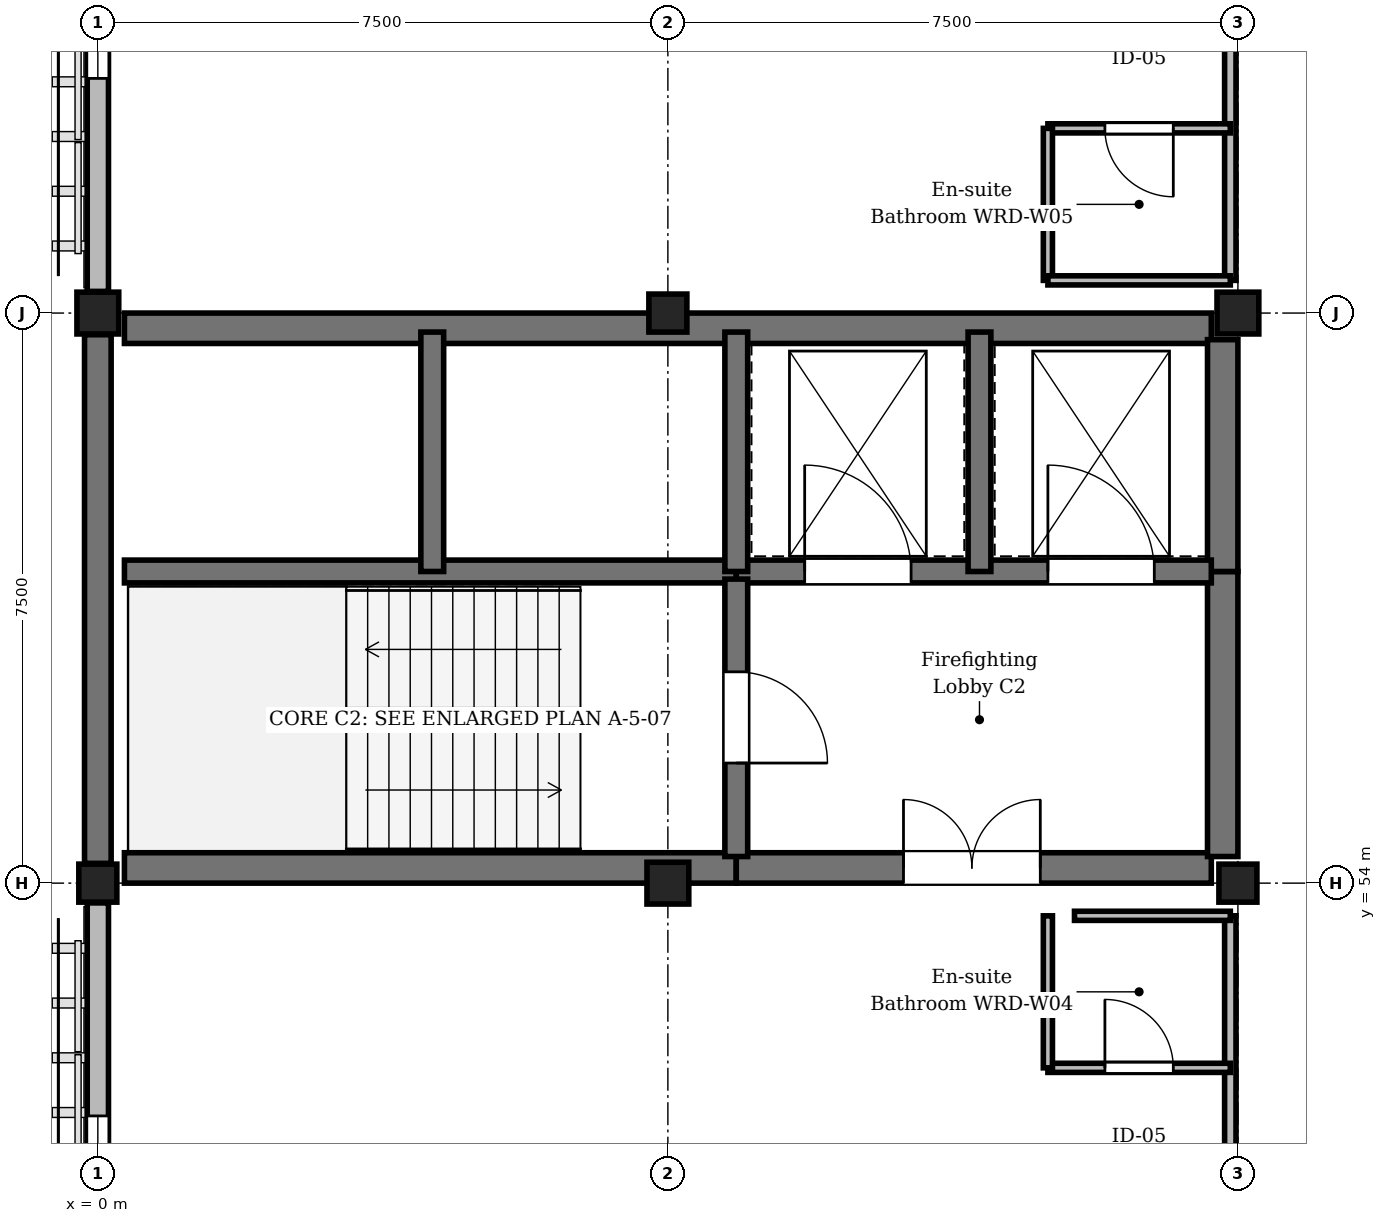
"""IFC4 building model, lengths in metres.
Left out: names, types, materials, properties, quantities, classifications, styles, units other than length and angle.
Written with IfcOpenShell. Run it as: python <this file> out.ifc"""

import sys

from ifc_helpers import new_model, si_unit, direction, frame, frame_2d, origin, origin_2d, place, context, subcontext, project, spatial, rectangle, extrude, element, fill, save


model = new_model("IFC4")
c1 = context("Model", 3, precision=1e-05, world=origin(), true_north=direction((0.0, 1.0)))
c2 = subcontext(c1, "Body", "Model", "MODEL_VIEW")
j1 = project(units=[si_unit("LENGTHUNIT", "METRE"), si_unit("PLANEANGLEUNIT", "RADIAN")], contexts=[c1])
p1 = place(None, origin())
s1 = spatial("IfcSite", under=j1, at=p1, CompositionType="ELEMENT")
p2 = place(p1, origin())
s2 = spatial("IfcBuilding", under=s1, at=p2, CompositionType="ELEMENT")
p3 = place(p2, frame((0.0, 0.0, 25.95)))
s3 = spatial("IfcBuildingStorey", under=s2, at=p3, CompositionType="ELEMENT", Elevation=25.95)
p4 = place(p3, frame((0.0, 54.0, 0.0), z_axis=(0.0, 0.0, 1.0), x_axis=(1.0, 0.0, 0.0)))
e1 = element("IfcColumn", 1, at=p4, inside=s3, PredefinedType="COLUMN", context=c2, shape_type="SweptSolid", body=[
    extrude(rectangle(XDim=0.5, YDim=0.5, at=origin_2d()), origin(), (0.0, 0.0, 1.0), 4.05),
])
for number, where, z_axis, x_axis in (
    (2, (0.0, 61.5, 0.0), (0.0, 0.0, 1.0), (1.0, 0.0, 0.0)),
    (3, (7.5, 54.0, 0.0), (0.0, 0.0, 1.0), (1.0, 0.0, 0.0)),
):
    element("IfcColumn", number, at=place(p3, frame(where, z_axis=z_axis, x_axis=x_axis)), inside=s3, PredefinedType="COLUMN", context=c2, shape_type="SweptSolid", body=[
        extrude(rectangle(XDim=0.55, YDim=0.55, at=origin_2d()), origin(), (0.0, 0.0, 1.0), 4.05),
    ])
for number, where, z_axis, x_axis in (
    (4, (7.5, 61.5, 0.0), (0.0, 0.0, 1.0), (1.0, 0.0, 0.0)),
    (5, (15.0, 54.0, 0.0), (0.0, 0.0, 1.0), (1.0, 0.0, 0.0)),
):
    element("IfcColumn", number, at=place(p3, frame(where, z_axis=z_axis, x_axis=x_axis)), inside=s3, PredefinedType="COLUMN", context=c2, shape_type="SweptSolid", body=[
        extrude(rectangle(XDim=0.5, YDim=0.5, at=origin_2d()), origin(), (0.0, 0.0, 1.0), 4.05),
    ])
p5 = place(p3, frame((15.0, 61.5, 0.0), z_axis=(0.0, 0.0, 1.0), x_axis=(1.0, 0.0, 0.0)))
e6 = element("IfcColumn", 6, at=p5, inside=s3, PredefinedType="COLUMN", context=c2, shape_type="SweptSolid", body=[
    extrude(rectangle(XDim=0.55, YDim=0.55, at=origin_2d()), origin(), (0.0, 0.0, 1.0), 4.05),
])
p6 = place(p3, frame((0.0, 46.785, 0.0), z_axis=(0.0, 0.0, 1.0), x_axis=(0.0, 1.0, 0.0)))
e7 = element("IfcWall", 7, at=p6, inside=s3, PredefinedType="STANDARD", context=c2, shape_type="SweptSolid", body=[
    extrude(rectangle(XDim=6.955, YDim=0.28, at=frame_2d((3.478, 0.0))), origin(), (0.0, 0.0, 1.0), 3.17),
])
p7 = place(p6, frame((2.802, 0.0, 0.85)))
e8 = element("IfcOpeningElement", 8, at=p7, cuts=e7, PredefinedType="OPENING", context=c2, shape_type="SweptSolid", body=[
    extrude(rectangle(XDim=1.35, YDim=2.04, at=frame_2d((0.675, 1.02))), frame((0.0, 0.15, 0.0), z_axis=(0.0, -1.0, 0.0), x_axis=(1.0, 0.0, 0.0)), (0.0, 0.0, 1.0), 0.3),
])
p8 = place(p3, frame((0.0, 54.26, 0.0), z_axis=(0.0, 0.0, 1.0), x_axis=(0.0, 1.0, 0.0)))
e9 = element("IfcWall", 9, at=p8, inside=s3, PredefinedType="SHEAR", context=c2, shape_type="SweptSolid", body=[
    extrude(rectangle(XDim=6.955, YDim=0.35, at=frame_2d((3.478, 0.0))), origin(), (0.0, 0.0, 1.0), 3.77),
])
p9 = place(p3, frame((0.0, 61.785, 0.0), z_axis=(0.0, 0.0, 1.0), x_axis=(0.0, 1.0, 0.0)))
e10 = element("IfcWall", 10, at=p9, inside=s3, PredefinedType="STANDARD", context=c2, shape_type="SweptSolid", body=[
    extrude(rectangle(XDim=6.955, YDim=0.28, at=frame_2d((3.478, 0.0))), origin(), (0.0, 0.0, 1.0), 3.17),
])
p10 = place(p9, frame((2.802, 0.0, 0.85)))
e11 = element("IfcOpeningElement", 11, at=p10, cuts=e10, PredefinedType="OPENING", context=c2, shape_type="SweptSolid", body=[
    extrude(rectangle(XDim=1.35, YDim=2.04, at=frame_2d((0.675, 1.02))), frame((0.0, 0.15, 0.0), z_axis=(0.0, -1.0, 0.0), x_axis=(1.0, 0.0, 0.0)), (0.0, 0.0, 1.0), 0.3),
])
p11 = place(p3, frame((0.35, 54.2, 0.0), z_axis=(0.0, 0.0, 1.0), x_axis=(1.0, 0.0, 0.0)))
e12 = element("IfcWall", 12, at=p11, inside=s3, PredefinedType="SHEAR", context=c2, shape_type="SweptSolid", body=[
    extrude(rectangle(XDim=8.05, YDim=0.4, at=frame_2d((4.025, 0.0))), origin(), (0.0, 0.0, 1.0), 3.77),
])
p12 = place(p3, frame((8.4, 54.2, 0.0), z_axis=(0.0, 0.0, 1.0), x_axis=(1.0, 0.0, 0.0)))
e13 = element("IfcWall", 13, at=p12, inside=s3, PredefinedType="SHEAR", context=c2, shape_type="SweptSolid", body=[
    extrude(rectangle(XDim=6.25, YDim=0.4, at=frame_2d((3.125, 0.0))), origin(), (0.0, 0.0, 1.0), 3.77),
])
p13 = place(p12, frame((2.2, 0.0, 0.0)))
e14 = element("IfcOpeningElement", 14, at=p13, cuts=e13, PredefinedType="OPENING", context=c2, shape_type="SweptSolid", body=[
    extrude(rectangle(XDim=1.8, YDim=2.25, at=frame_2d((0.9, 1.125))), frame((0.0, 0.21, 0.0), z_axis=(0.0, -1.0, 0.0), x_axis=(1.0, 0.0, 0.0)), (0.0, 0.0, 1.0), 0.42),
])
p14 = place(p3, frame((0.35, 61.3, 0.0), z_axis=(0.0, 0.0, 1.0), x_axis=(1.0, 0.0, 0.0)))
e15 = element("IfcWall", 15, at=p14, inside=s3, PredefinedType="SHEAR", context=c2, shape_type="SweptSolid", body=[
    extrude(rectangle(XDim=14.3, YDim=0.4, at=frame_2d((7.15, 0.0))), origin(), (0.0, 0.0, 1.0), 3.77),
])
p15 = place(p3, frame((14.8, 54.35, 0.0), z_axis=(0.0, 0.0, 1.0), x_axis=(0.0, 1.0, 0.0)))
e16 = element("IfcWall", 16, at=p15, inside=s3, PredefinedType="SHEAR", context=c2, shape_type="SweptSolid", body=[
    extrude(rectangle(XDim=3.75, YDim=0.4, at=frame_2d((1.875, 0.0))), origin(), (0.0, 0.0, 1.0), 3.77),
])
p16 = place(p3, frame((14.8, 58.1, 0.0), z_axis=(0.0, 0.0, 1.0), x_axis=(0.0, 1.0, 0.0)))
e17 = element("IfcWall", 17, at=p16, inside=s3, PredefinedType="SHEAR", context=c2, shape_type="SweptSolid", body=[
    extrude(rectangle(XDim=3.05, YDim=0.4, at=frame_2d((1.525, 0.0))), origin(), (0.0, 0.0, 1.0), 3.77),
])
p17 = place(p3, frame((0.35, 58.1, 0.0), z_axis=(0.0, 0.0, 1.0), x_axis=(1.0, 0.0, 0.0)))
e18 = element("IfcWall", 18, at=p17, inside=s3, PredefinedType="SHEAR", context=c2, shape_type="SweptSolid", body=[
    extrude(rectangle(XDim=8.05, YDim=0.3, at=frame_2d((4.025, 0.0))), origin(), (0.0, 0.0, 1.0), 3.77),
])
p18 = place(p3, frame((8.4, 58.1, 0.0), z_axis=(0.0, 0.0, 1.0), x_axis=(1.0, 0.0, 0.0)))
e19 = element("IfcWall", 19, at=p18, inside=s3, PredefinedType="SHEAR", context=c2, shape_type="SweptSolid", body=[
    extrude(rectangle(XDim=6.25, YDim=0.3, at=frame_2d((3.125, 0.0))), origin(), (0.0, 0.0, 1.0), 3.77),
])
p19 = place(p18, frame((0.9, 0.0, 0.0)))
e20 = element("IfcOpeningElement", 20, at=p19, cuts=e19, PredefinedType="OPENING", context=c2, shape_type="SweptSolid", body=[
    extrude(rectangle(XDim=1.4, YDim=2.25, at=frame_2d((0.7, 1.125))), frame((0.0, 0.16, 0.0), z_axis=(0.0, -1.0, 0.0), x_axis=(1.0, 0.0, 0.0)), (0.0, 0.0, 1.0), 0.32),
])
p20 = place(p18, frame((4.1, 0.0, 0.0)))
e21 = element("IfcOpeningElement", 21, at=p20, cuts=e19, PredefinedType="OPENING", context=c2, shape_type="SweptSolid", body=[
    extrude(rectangle(XDim=1.4, YDim=2.25, at=frame_2d((0.7, 1.125))), frame((0.0, 0.16, 0.0), z_axis=(0.0, -1.0, 0.0), x_axis=(1.0, 0.0, 0.0)), (0.0, 0.0, 1.0), 0.32),
])
p21 = place(p3, frame((8.4, 58.0, 0.0), z_axis=(0.0, 0.0, 1.0), x_axis=(0.0, -1.0, 0.0)))
e22 = element("IfcWall", 22, at=p21, inside=s3, PredefinedType="SHEAR", context=c2, shape_type="SweptSolid", body=[
    extrude(rectangle(XDim=3.65, YDim=0.3, at=frame_2d((1.825, 0.0))), origin(), (0.0, 0.0, 1.0), 3.77),
])
p22 = place(p21, frame((1.22, 0.0, 0.0)))
e23 = element("IfcOpeningElement", 23, at=p22, cuts=e22, PredefinedType="OPENING", context=c2, shape_type="SweptSolid", body=[
    extrude(rectangle(XDim=1.2, YDim=2.25, at=frame_2d((0.6, 1.125))), frame((0.0, 0.16, 0.0), z_axis=(0.0, -1.0, 0.0), x_axis=(1.0, 0.0, 0.0)), (0.0, 0.0, 1.0), 0.32),
])
for number, where, z_axis, x_axis in (
    (24, (4.4, 58.1, 0.0), (0.0, 0.0, 1.0), (0.0, 1.0, 0.0)),
    (25, (8.4, 58.1, 0.0), (0.0, 0.0, 1.0), (0.0, 1.0, 0.0)),
    (26, (11.6, 58.1, 0.0), (0.0, 0.0, 1.0), (0.0, 1.0, 0.0)),
):
    element("IfcWall", number, at=place(p3, frame(where, z_axis=z_axis, x_axis=x_axis)), inside=s3, PredefinedType="SHEAR", context=c2, shape_type="SweptSolid", body=[
        extrude(rectangle(XDim=3.15, YDim=0.3, at=frame_2d((1.575, 0.0))), origin(), (0.0, 0.0, 1.0), 3.77),
    ])
p23 = place(p3, frame((14.9, 40.963, 0.0), z_axis=(0.0, 0.0, 1.0), x_axis=(0.0, 1.0, 0.0)))
e27 = element("IfcWall", 27, at=p23, inside=s3, PredefinedType="PARTITIONING", context=c2, shape_type="SweptSolid", body=[
    extrude(rectangle(XDim=12.607, YDim=0.15, at=frame_2d((6.303, 0.0))), origin(), (0.0, 0.0, 1.0), 3.205),
])
p24 = place(p23, frame((1.331, 0.0, 0.0)))
e28 = element("IfcOpeningElement", 28, at=p24, cuts=e27, PredefinedType="OPENING", context=c2, shape_type="SweptSolid", body=[
    extrude(rectangle(XDim=1.3, YDim=2.2, at=frame_2d((0.65, 1.1))), frame((0.0, 0.085, 0.0), z_axis=(0.0, -1.0, 0.0), x_axis=(1.0, 0.0, 0.0)), (0.0, 0.0, 1.0), 0.17),
])
p25 = place(p3, frame((12.5, 51.57, 0.0), z_axis=(0.0, 0.0, 1.0), x_axis=(1.0, 0.0, 0.0)))
e29 = element("IfcWall", 29, at=p25, inside=s3, PredefinedType="PARTITIONING", context=c2, shape_type="SweptSolid", body=[
    extrude(rectangle(XDim=2.4, YDim=0.12, at=frame_2d((1.2, 0.0))), origin(), (0.0, 0.0, 1.0), 3.755),
])
p26 = place(p25, frame((0.75, 0.0, 0.0)))
e30 = element("IfcOpeningElement", 30, at=p26, cuts=e29, PredefinedType="OPENING", context=c2, shape_type="SweptSolid", body=[
    extrude(rectangle(XDim=0.9, YDim=2.1, at=frame_2d((0.45, 1.05))), frame((0.0, 0.07, 0.0), z_axis=(0.0, -1.0, 0.0), x_axis=(1.0, 0.0, 0.0)), (0.0, 0.0, 1.0), 0.14),
])
p27 = place(p3, frame((12.5, 51.57, 0.0), z_axis=(0.0, 0.0, 1.0), x_axis=(0.0, 1.0, 0.0)))
e31 = element("IfcWall", 31, at=p27, inside=s3, PredefinedType="PARTITIONING", context=c2, shape_type="SweptSolid", body=[
    extrude(rectangle(XDim=2.0, YDim=0.12, at=frame_2d((1.0, 0.0))), origin(), (0.0, 0.0, 1.0), 3.755),
])
p28 = place(p3, frame((14.9, 61.93, 0.0), z_axis=(0.0, 0.0, 1.0), x_axis=(0.0, 1.0, 0.0)))
e32 = element("IfcWall", 32, at=p28, inside=s3, PredefinedType="PARTITIONING", context=c2, shape_type="SweptSolid", body=[
    extrude(rectangle(XDim=11.49, YDim=0.15, at=frame_2d((5.745, 0.0))), origin(), (0.0, 0.0, 1.0), 3.205),
])
p29 = place(p28, frame((9.94, 0.0, 0.0)))
e33 = element("IfcOpeningElement", 33, at=p29, cuts=e32, PredefinedType="OPENING", context=c2, shape_type="SweptSolid", body=[
    extrude(rectangle(XDim=1.3, YDim=2.2, at=frame_2d((0.65, 1.1))), frame((0.0, 0.085, 0.0), z_axis=(0.0, -1.0, 0.0), x_axis=(1.0, 0.0, 0.0)), (0.0, 0.0, 1.0), 0.17),
])
p30 = place(p3, frame((14.9, 63.93, 0.0), z_axis=(0.0, 0.0, 1.0), x_axis=(-1.0, 0.0, 0.0)))
e34 = element("IfcWall", 34, at=p30, inside=s3, PredefinedType="PARTITIONING", context=c2, shape_type="SweptSolid", body=[
    extrude(rectangle(XDim=2.4, YDim=0.12, at=frame_2d((1.2, 0.0))), origin(), (0.0, 0.0, 1.0), 3.755),
])
p31 = place(p30, frame((0.75, 0.0, 0.0)))
e35 = element("IfcOpeningElement", 35, at=p31, cuts=e34, PredefinedType="OPENING", context=c2, shape_type="SweptSolid", body=[
    extrude(rectangle(XDim=0.9, YDim=2.1, at=frame_2d((0.45, 1.05))), frame((0.0, 0.07, 0.0), z_axis=(0.0, -1.0, 0.0), x_axis=(1.0, 0.0, 0.0)), (0.0, 0.0, 1.0), 0.14),
])
p32 = place(p3, frame((12.5, 61.93, 0.0), z_axis=(0.0, 0.0, 1.0), x_axis=(0.0, 1.0, 0.0)))
e36 = element("IfcWall", 36, at=p32, inside=s3, PredefinedType="PARTITIONING", context=c2, shape_type="SweptSolid", body=[
    extrude(rectangle(XDim=2.0, YDim=0.12, at=frame_2d((1.0, 0.0))), origin(), (0.0, 0.0, 1.0), 3.755),
])
p33 = place(p3, frame((12.85, 53.57, 0.0), z_axis=(0.0, 0.0, 1.0), x_axis=(1.0, 0.0, 0.0)))
e37 = element("IfcWall", 37, at=p33, inside=s3, PredefinedType="PARTITIONING", context=c2, shape_type="SweptSolid", body=[
    extrude(rectangle(XDim=2.05, YDim=0.12, at=frame_2d((1.025, 0.0))), origin(), (0.0, 0.0, 1.0), 3.755),
])
p34 = place(p3, frame((12.5, 61.93, 0.0), z_axis=(0.0, 0.0, 1.0), x_axis=(1.0, 0.0, 0.0)))
e38 = element("IfcWall", 38, at=p34, inside=s3, PredefinedType="PARTITIONING", context=c2, shape_type="SweptSolid", body=[
    extrude(rectangle(XDim=2.4, YDim=0.12, at=frame_2d((1.2, 0.0))), origin(), (0.0, 0.0, 1.0), 3.755),
])
p35 = place(p7, origin())
e39 = element("IfcWindow", 39, at=p35, inside=s3, PartitioningType="SINGLE_PANEL", PredefinedType="WINDOW", context=c2, shape_type="SweptSolid", body=[
    extrude(rectangle(XDim=1.35, YDim=2.04, at=frame_2d((0.675, 1.02))), frame((0.0, 0.03, 0.0), z_axis=(0.0, -1.0, 0.0), x_axis=(1.0, 0.0, 0.0)), (0.0, 0.0, 1.0), 0.06),
])
fill(e8, e39)
p36 = place(p10, origin())
e40 = element("IfcWindow", 40, at=p36, inside=s3, PartitioningType="SINGLE_PANEL", PredefinedType="WINDOW", context=c2, shape_type="SweptSolid", body=[
    extrude(rectangle(XDim=1.35, YDim=2.04, at=frame_2d((0.675, 1.02))), frame((0.0, 0.03, 0.0), z_axis=(0.0, -1.0, 0.0), x_axis=(1.0, 0.0, 0.0)), (0.0, 0.0, 1.0), 0.06),
])
fill(e11, e40)
p37 = place(p13, origin())
e41 = element("IfcDoor", 41, at=p37, inside=s3, OperationType="DOUBLE_DOOR_SINGLE_SWING", PredefinedType="DOOR", context=c2, shape_type="SweptSolid", body=[
    extrude(rectangle(XDim=1.8, YDim=2.25, at=frame_2d((0.9, 1.125))), frame((0.0, 0.025, 0.0), z_axis=(0.0, -1.0, 0.0), x_axis=(1.0, 0.0, 0.0)), (0.0, 0.0, 1.0), 0.05),
])
fill(e14, e41)
p38 = place(p19, origin())
e42 = element("IfcDoor", 42, at=p38, inside=s3, OperationType="DOUBLE_DOOR_SLIDING", PredefinedType="DOOR", context=c2, shape_type="SweptSolid", body=[
    extrude(rectangle(XDim=1.4, YDim=2.25, at=frame_2d((0.7, 1.125))), frame((0.0, 0.025, 0.0), z_axis=(0.0, -1.0, 0.0), x_axis=(1.0, 0.0, 0.0)), (0.0, 0.0, 1.0), 0.05),
])
fill(e20, e42)
p39 = place(p20, origin())
e43 = element("IfcDoor", 43, at=p39, inside=s3, OperationType="DOUBLE_DOOR_SLIDING", PredefinedType="DOOR", context=c2, shape_type="SweptSolid", body=[
    extrude(rectangle(XDim=1.4, YDim=2.25, at=frame_2d((0.7, 1.125))), frame((0.0, 0.025, 0.0), z_axis=(0.0, -1.0, 0.0), x_axis=(1.0, 0.0, 0.0)), (0.0, 0.0, 1.0), 0.05),
])
fill(e21, e43)
p40 = place(p22, origin())
e44 = element("IfcDoor", 44, at=p40, inside=s3, OperationType="SINGLE_SWING_RIGHT", PredefinedType="DOOR", context=c2, shape_type="SweptSolid", body=[
    extrude(rectangle(XDim=1.2, YDim=2.25, at=frame_2d((0.6, 1.125))), frame((0.0, 0.025, 0.0), z_axis=(0.0, -1.0, 0.0), x_axis=(1.0, 0.0, 0.0)), (0.0, 0.0, 1.0), 0.05),
])
fill(e23, e44)
p41 = place(p26, origin())
e45 = element("IfcDoor", 45, at=p41, inside=s3, OperationType="SINGLE_SWING_LEFT", PredefinedType="DOOR", context=c2, shape_type="SweptSolid", body=[
    extrude(rectangle(XDim=0.9, YDim=2.1, at=frame_2d((0.45, 1.05))), frame((0.0, 0.025, 0.0), z_axis=(0.0, -1.0, 0.0), x_axis=(1.0, 0.0, 0.0)), (0.0, 0.0, 1.0), 0.05),
])
fill(e30, e45)
p42 = place(p31, origin())
e46 = element("IfcDoor", 46, at=p42, inside=s3, OperationType="SINGLE_SWING_LEFT", PredefinedType="DOOR", context=c2, shape_type="SweptSolid", body=[
    extrude(rectangle(XDim=0.9, YDim=2.1, at=frame_2d((0.45, 1.05))), frame((0.0, 0.025, 0.0), z_axis=(0.0, -1.0, 0.0), x_axis=(1.0, 0.0, 0.0)), (0.0, 0.0, 1.0), 0.05),
])
fill(e35, e46)
save(model, sys.argv[1])
